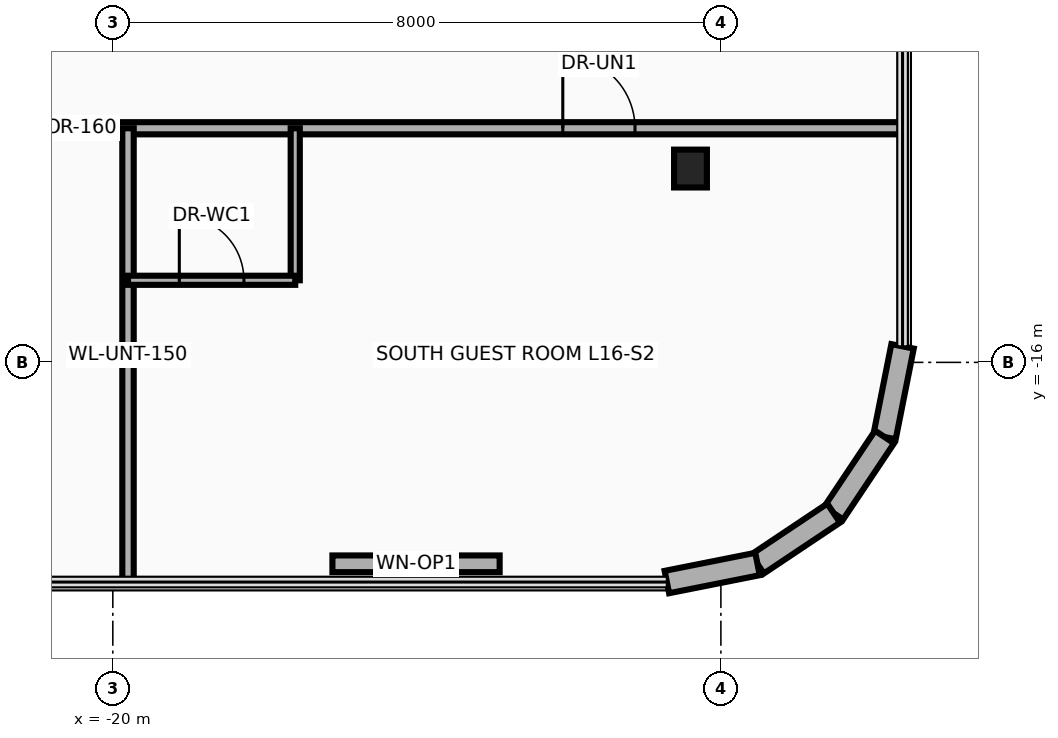
"""IFC4 building model, lengths in metres.
Left out: names, types, materials, properties, quantities, classifications, styles, units other than length and angle.
Written with IfcOpenShell. Run it as: python <this file> out.ifc"""

import sys

from ifc_helpers import new_model, si_unit, direction, frame, frame_2d, origin, origin_2d, place, context, subcontext, project, spatial, rectangle, i_section, extrude, source, transform, mapped, element, fill, save


model = new_model("IFC4")
c1 = context("Model", 3, precision=1e-05, world=origin(), true_north=direction((0.0, 1.0)))
c2 = subcontext(c1, "Body", "Model", "MODEL_VIEW")
j1 = project(units=[si_unit("LENGTHUNIT", "METRE"), si_unit("PLANEANGLEUNIT", "RADIAN")], contexts=[c1])
p1 = place(None, origin())
s1 = spatial("IfcSite", under=j1, at=p1, CompositionType="ELEMENT")
p2 = place(p1, origin())
s2 = spatial("IfcBuilding", under=s1, at=p2, CompositionType="ELEMENT")
p3 = place(p2, frame((0.0, 0.0, 66.7)))
s3 = spatial("IfcBuildingStorey", under=s2, at=p3, CompositionType="ELEMENT", Elevation=66.7)
m1 = source(origin(), c2, "Body", "SweptSolid", [
    extrude(i_section(OverallWidth=0.432, OverallDepth=0.498, WebThickness=0.056, FlangeThickness=0.089, at=origin_2d()), origin(), (0.0, 0.0, 1.0), 3.7),
])
p4 = place(p3, frame((-12.4, -13.45, 0.0), z_axis=(0.0, 0.0, 1.0), x_axis=(1.0, 0.0, 0.0)))
e1 = element("IfcColumn", 1, at=p4, inside=s3, PredefinedType="COLUMN", context=c2, shape_type="MappedRepresentation", body=[
    mapped(m1, transform((0.0, 0.0, 0.0), x_axis=(1.0, 0.0, 0.0), y_axis=(0.0, 1.0, 0.0), z_axis=(0.0, 0.0, 1.0), scale=1.0)),
])
p5 = place(p3, frame((-9.61, -15.789, 0.0), z_axis=(0.0, 0.0, 1.0), x_axis=(-0.194996050505, -0.980804027463, 0.0)))
e2 = element("IfcWall", 2, at=p5, inside=s3, PredefinedType="SOLIDWALL", context=c2, shape_type="SweptSolid", body=[
    extrude(rectangle(XDim=1.216, YDim=0.3, at=frame_2d((0.608, 0.0))), origin(), (0.0, 0.0, 1.0), 3.46),
])
for number, where, z_axis, x_axis in (
    (3, (-9.847, -16.982, 0.0), (0.0, 0.0, 1.0), (-0.556, -0.831, 0.0)),
    (4, (-10.517, -17.983, 0.0), (0.0, 0.0, 1.0), (-0.831, -0.556, 0.0)),
):
    element("IfcWall", number, at=place(p3, frame(where, z_axis=z_axis, x_axis=x_axis)), inside=s3, PredefinedType="SOLIDWALL", context=c2, shape_type="SweptSolid", body=[
        extrude(rectangle(XDim=1.205, YDim=0.3, at=frame_2d((0.603, 0.0))), origin(), (0.0, 0.0, 1.0), 3.46),
    ])
p6 = place(p3, frame((-11.518, -18.653, 0.0), z_axis=(0.0, 0.0, 1.0), x_axis=(-0.980804027463, -0.194996050505, 0.0)))
e5 = element("IfcWall", 5, at=p6, inside=s3, PredefinedType="SOLIDWALL", context=c2, shape_type="SweptSolid", body=[
    extrude(rectangle(XDim=1.216, YDim=0.3, at=frame_2d((0.608, 0.0))), origin(), (0.0, 0.0, 1.0), 3.46),
])
p7 = place(p3, frame((-14.911, -18.65, 0.0), z_axis=(0.0, 0.0, 1.0), x_axis=(-1.0, 0.0, 0.0)))
e6 = element("IfcWall", 6, at=p7, inside=s3, PredefinedType="SOLIDWALL", context=c2, shape_type="SweptSolid", body=[
    extrude(rectangle(XDim=2.2, YDim=0.22, at=frame_2d((1.1, 0.0))), origin(), (0.0, 0.0, 1.0), 3.46),
])
p8 = place(p7, frame((0.65, 0.0, 0.95)))
e7 = element("IfcOpeningElement", 7, at=p8, cuts=e6, PredefinedType="OPENING", context=c2, shape_type="SweptSolid", body=[
    extrude(rectangle(XDim=0.9, YDim=1.3, at=frame_2d((0.45, 0.65))), frame((0.0, 0.125, 0.0), z_axis=(0.0, -1.0, 0.0), x_axis=(1.0, 0.0, 0.0)), (0.0, 0.0, 1.0), 0.25),
])
p9 = place(p3, frame((-31.89, -12.92, 0.0), z_axis=(0.0, 0.0, 1.0), x_axis=(1.0, 0.0, 0.0)))
e8 = element("IfcWall", 8, at=p9, inside=s3, PredefinedType="PARTITIONING", context=c2, shape_type="SweptSolid", body=[
    extrude(rectangle(XDim=22.28, YDim=0.16, at=frame_2d((11.14, 0.0))), origin(), (0.0, 0.0, 1.0), 2.834),
])
p10 = place(p9, frame((6.67, 0.0, 0.0)))
e9 = element("IfcOpeningElement", 9, at=p10, cuts=e8, PredefinedType="OPENING", context=c2, shape_type="SweptSolid", body=[
    extrude(rectangle(XDim=0.95, YDim=2.15, at=frame_2d((0.475, 1.075))), frame((0.0, 0.095, 0.0), z_axis=(0.0, -1.0, 0.0), x_axis=(1.0, 0.0, 0.0)), (0.0, 0.0, 1.0), 0.19),
])
p11 = place(p9, frame((17.81, 0.0, 0.0)))
e10 = element("IfcOpeningElement", 10, at=p11, cuts=e8, PredefinedType="OPENING", context=c2, shape_type="SweptSolid", body=[
    extrude(rectangle(XDim=0.95, YDim=2.15, at=frame_2d((0.475, 1.075))), frame((0.0, 0.095, 0.0), z_axis=(0.0, -1.0, 0.0), x_axis=(1.0, 0.0, 0.0)), (0.0, 0.0, 1.0), 0.19),
])
p12 = place(p3, frame((-19.8, -18.89, 0.0), z_axis=(0.0, 0.0, 1.0), x_axis=(0.0, 1.0, 0.0)))
e11 = element("IfcWall", 11, at=p12, inside=s3, PredefinedType="PARTITIONING", context=c2, shape_type="SweptSolid", body=[
    extrude(rectangle(XDim=5.97, YDim=0.15, at=frame_2d((2.985, 0.0))), origin(), (0.0, 0.0, 1.0), 2.896),
])
p13 = place(p3, frame((-17.6, -14.92, 0.0), z_axis=(0.0, 0.0, 1.0), x_axis=(0.0, 1.0, 0.0)))
e12 = element("IfcWall", 12, at=p13, inside=s3, PredefinedType="PARTITIONING", context=c2, shape_type="SweptSolid", body=[
    extrude(rectangle(XDim=2.0, YDim=0.12, at=frame_2d((1.0, 0.0))), origin(), (0.0, 0.0, 1.0), 2.896),
])
p14 = place(p3, frame((-19.8, -14.92, 0.0), z_axis=(0.0, 0.0, 1.0), x_axis=(1.0, 0.0, 0.0)))
e13 = element("IfcWall", 13, at=p14, inside=s3, PredefinedType="PARTITIONING", context=c2, shape_type="SweptSolid", body=[
    extrude(rectangle(XDim=2.2, YDim=0.12, at=frame_2d((1.1, 0.0))), origin(), (0.0, 0.0, 1.0), 3.46),
])
p15 = place(p14, frame((0.675, 0.0, 0.0)))
e14 = element("IfcOpeningElement", 14, at=p15, cuts=e13, PredefinedType="OPENING", context=c2, shape_type="SweptSolid", body=[
    extrude(rectangle(XDim=0.85, YDim=2.1, at=frame_2d((0.425, 1.05))), frame((0.0, 0.075, 0.0), z_axis=(0.0, -1.0, 0.0), x_axis=(1.0, 0.0, 0.0)), (0.0, 0.0, 1.0), 0.15),
])
p16 = place(p8, origin())
e15 = element("IfcWindow", 15, at=p16, inside=s3, PartitioningType="SINGLE_PANEL", PredefinedType="WINDOW", context=c2, shape_type="SweptSolid", body=[
    extrude(rectangle(XDim=0.9, YDim=1.3, at=frame_2d((0.45, 0.65))), frame((0.0, 0.03, 0.0), z_axis=(0.0, -1.0, 0.0), x_axis=(1.0, 0.0, 0.0)), (0.0, 0.0, 1.0), 0.06),
])
fill(e7, e15)
p17 = place(p11, origin())
e16 = element("IfcDoor", 16, at=p17, inside=s3, OperationType="SINGLE_SWING_RIGHT", PredefinedType="DOOR", context=c2, shape_type="SweptSolid", body=[
    extrude(rectangle(XDim=0.95, YDim=2.15, at=frame_2d((0.475, 1.075))), frame((0.0, 0.025, 0.0), z_axis=(0.0, -1.0, 0.0), x_axis=(1.0, 0.0, 0.0)), (0.0, 0.0, 1.0), 0.05),
])
fill(e10, e16)
p18 = place(p15, origin())
e17 = element("IfcDoor", 17, at=p18, inside=s3, OperationType="SINGLE_SWING_LEFT", PredefinedType="DOOR", context=c2, shape_type="SweptSolid", body=[
    extrude(rectangle(XDim=0.85, YDim=2.1, at=frame_2d((0.425, 1.05))), frame((0.0, 0.025, 0.0), z_axis=(0.0, -1.0, 0.0), x_axis=(1.0, 0.0, 0.0)), (0.0, 0.0, 1.0), 0.05),
])
fill(e14, e17)
save(model, sys.argv[1])
